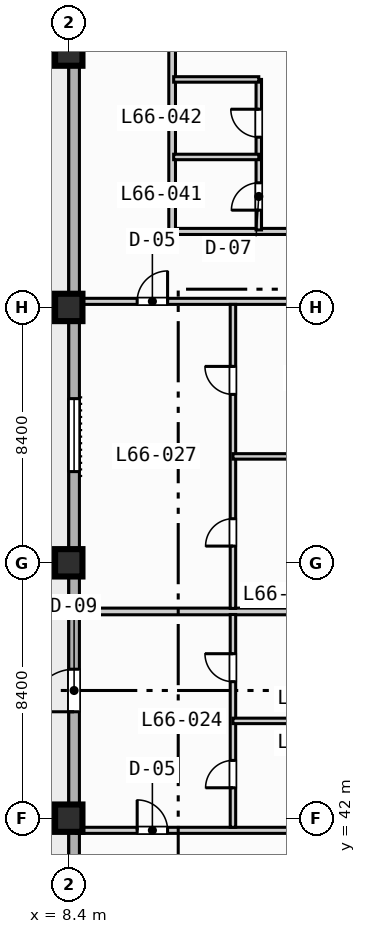
"""IFC4 building model, lengths in metres.
Left out: names, types, materials, properties, quantities, classifications, styles, units other than length and angle.
Written with IfcOpenShell. Run it as: python <this file> out.ifc"""

import sys

from ifc_helpers import new_model, si_unit, direction, frame, frame_2d, origin, origin_2d, place, context, subcontext, project, spatial, rectangle, extrude, element, fill, save


model = new_model("IFC4")
c1 = context("Model", 3, precision=1e-05, world=origin(), true_north=direction((0.0, 1.0)))
c2 = subcontext(c1, "Body", "Model", "MODEL_VIEW")
j1 = project(units=[si_unit("LENGTHUNIT", "METRE"), si_unit("PLANEANGLEUNIT", "RADIAN")], contexts=[c1])
p1 = place(None, origin())
s1 = spatial("IfcSite", under=j1, at=p1, CompositionType="ELEMENT")
p2 = place(p1, origin())
s2 = spatial("IfcBuilding", under=s1, at=p2, CompositionType="ELEMENT")
p3 = place(p2, frame((0.0, 0.0, 267.5)))
s3 = spatial("IfcBuildingStorey", under=s2, at=p3, CompositionType="ELEMENT", Elevation=267.5)
for number, where, z_axis, x_axis in (
    (1, (8.4, 42.0, 0.0), (0.0, 0.0, 1.0), (1.0, 0.0, 0.0)),
    (2, (8.4, 50.4, 0.0), (0.0, 0.0, 1.0), (1.0, 0.0, 0.0)),
    (3, (8.4, 58.8, 0.0), (0.0, 0.0, 1.0), (1.0, 0.0, 0.0)),
    (4, (8.4, 67.2, 0.0), (0.0, 0.0, 1.0), (1.0, 0.0, 0.0)),
):
    element("IfcColumn", number, at=place(p3, frame(where, z_axis=z_axis, x_axis=x_axis)), inside=s3, PredefinedType="COLUMN", context=c2, shape_type="SweptSolid", body=[
        extrude(rectangle(XDim=0.9, YDim=0.9, at=origin_2d()), origin(), (0.0, 0.0, 1.0), 3.7),
    ])
p4 = place(p3, frame((8.575, 11.575, 0.0), z_axis=(0.0, 0.0, 1.0), x_axis=(0.0, 1.0, 0.0)))
e5 = element("IfcWall", 5, at=p4, inside=s3, PredefinedType="STANDARD", context=c2, shape_type="SweptSolid", body=[
    extrude(rectangle(XDim=60.85, YDim=0.35, at=frame_2d((30.425, 0.0))), origin(), (0.0, 0.0, 1.0), 3.47),
])
p5 = place(p4, frame((33.925, 0.0, 0.0)))
e6 = element("IfcOpeningElement", 6, at=p5, cuts=e5, PredefinedType="OPENING", context=c2, shape_type="SweptSolid", body=[
    extrude(rectangle(XDim=1.4, YDim=2.2, at=frame_2d((0.7, 1.1))), frame((0.0, 0.185, 0.0), z_axis=(0.0, -1.0, 0.0), x_axis=(1.0, 0.0, 0.0)), (0.0, 0.0, 1.0), 0.37),
])
p6 = place(p4, frame((25.025, 0.0, 0.85)))
e7 = element("IfcOpeningElement", 7, at=p6, cuts=e5, PredefinedType="OPENING", context=c2, shape_type="SweptSolid", body=[
    extrude(rectangle(XDim=2.4, YDim=1.95, at=frame_2d((1.2, 0.975))), frame((0.0, 0.185, 0.0), z_axis=(0.0, -1.0, 0.0), x_axis=(1.0, 0.0, 0.0)), (0.0, 0.0, 1.0), 0.37),
])
p7 = place(p4, frame((41.825, 0.0, 0.85)))
e8 = element("IfcOpeningElement", 8, at=p7, cuts=e5, PredefinedType="OPENING", context=c2, shape_type="SweptSolid", body=[
    extrude(rectangle(XDim=2.4, YDim=1.95, at=frame_2d((1.2, 0.975))), frame((0.0, 0.185, 0.0), z_axis=(0.0, -1.0, 0.0), x_axis=(1.0, 0.0, 0.0)), (0.0, 0.0, 1.0), 0.37),
])
p8 = place(p4, frame((19.25, 0.0, 0.85)))
e9 = element("IfcOpeningElement", 9, at=p8, cuts=e5, PredefinedType="OPENING", context=c2, shape_type="SweptSolid", body=[
    extrude(rectangle(XDim=1.8, YDim=1.8, at=frame_2d((0.9, 0.9))), frame((0.0, 0.185, 0.0), z_axis=(0.0, -1.0, 0.0), x_axis=(1.0, 0.0, 0.0)), (0.0, 0.0, 1.0), 0.37),
])
p9 = place(p3, frame((8.65, 41.6, 0.0), z_axis=(0.0, 0.0, 1.0), x_axis=(1.0, 0.0, 0.0)))
e10 = element("IfcWall", 10, at=p9, inside=s3, PredefinedType="PARTITIONING", context=c2, shape_type="SweptSolid", body=[
    extrude(rectangle(XDim=7.95, YDim=0.2, at=frame_2d((3.975, 0.0))), origin(), (0.0, 0.0, 1.0), 3.47),
])
p10 = place(p9, frame((2.0, 0.0, 0.0)))
e11 = element("IfcOpeningElement", 11, at=p10, cuts=e10, PredefinedType="OPENING", context=c2, shape_type="SweptSolid", body=[
    extrude(rectangle(XDim=1.0, YDim=2.15, at=frame_2d((0.5, 1.075))), frame((0.0, 0.11, 0.0), z_axis=(0.0, -1.0, 0.0), x_axis=(1.0, 0.0, 0.0)), (0.0, 0.0, 1.0), 0.22),
])
p11 = place(p3, frame((8.65, 59.0, 0.0), z_axis=(0.0, 0.0, 1.0), x_axis=(1.0, 0.0, 0.0)))
e12 = element("IfcWall", 12, at=p11, inside=s3, PredefinedType="PARTITIONING", context=c2, shape_type="SweptSolid", body=[
    extrude(rectangle(XDim=7.95, YDim=0.2, at=frame_2d((3.975, 0.0))), origin(), (0.0, 0.0, 1.0), 2.82),
])
p12 = place(p11, frame((2.0, 0.0, 0.0)))
e13 = element("IfcOpeningElement", 13, at=p12, cuts=e12, PredefinedType="OPENING", context=c2, shape_type="SweptSolid", body=[
    extrude(rectangle(XDim=1.0, YDim=2.15, at=frame_2d((0.5, 1.075))), frame((0.0, 0.11, 0.0), z_axis=(0.0, -1.0, 0.0), x_axis=(1.0, 0.0, 0.0)), (0.0, 0.0, 1.0), 0.22),
])
p13 = place(p3, frame((8.65, 48.8, 0.0), z_axis=(0.0, 0.0, 1.0), x_axis=(1.0, 0.0, 0.0)))
e14 = element("IfcWall", 14, at=p13, inside=s3, PredefinedType="PARTITIONING", context=c2, shape_type="SweptSolid", body=[
    extrude(rectangle(XDim=7.95, YDim=0.22, at=frame_2d((3.975, 0.0))), origin(), (0.0, 0.0, 1.0), 3.47),
])
p14 = place(p3, frame((13.8, 41.7, 0.0), z_axis=(0.0, 0.0, 1.0), x_axis=(0.0, 1.0, 0.0)))
e15 = element("IfcWall", 15, at=p14, inside=s3, PredefinedType="PLUMBINGWALL", context=c2, shape_type="SweptSolid", body=[
    extrude(rectangle(XDim=7.0, YDim=0.18, at=frame_2d((3.5, 0.0))), origin(), (0.0, 0.0, 1.0), 3.47),
])
p15 = place(p14, frame((1.3, 0.0, 0.0)))
e16 = element("IfcOpeningElement", 16, at=p15, cuts=e15, PredefinedType="OPENING", context=c2, shape_type="SweptSolid", body=[
    extrude(rectangle(XDim=0.9, YDim=2.1, at=frame_2d((0.45, 1.05))), frame((0.0, 0.1, 0.0), z_axis=(0.0, -1.0, 0.0), x_axis=(1.0, 0.0, 0.0)), (0.0, 0.0, 1.0), 0.2),
])
p16 = place(p14, frame((4.79, 0.0, 0.0)))
e17 = element("IfcOpeningElement", 17, at=p16, cuts=e15, PredefinedType="OPENING", context=c2, shape_type="SweptSolid", body=[
    extrude(rectangle(XDim=0.92, YDim=2.1, at=frame_2d((0.46, 1.05))), frame((0.0, 0.1, 0.0), z_axis=(0.0, -1.0, 0.0), x_axis=(1.0, 0.0, 0.0)), (0.0, 0.0, 1.0), 0.2),
])
p17 = place(p3, frame((13.8, 45.2, 0.0), z_axis=(0.0, 0.0, 1.0), x_axis=(1.0, 0.0, 0.0)))
e18 = element("IfcWall", 18, at=p17, inside=s3, PredefinedType="PLUMBINGWALL", context=c2, shape_type="SweptSolid", body=[
    extrude(rectangle(XDim=2.8, YDim=0.18, at=frame_2d((1.4, 0.0))), origin(), (0.0, 0.0, 1.0), 3.47),
])
p18 = place(p3, frame((13.8, 48.9, 0.0), z_axis=(0.0, 0.0, 1.0), x_axis=(0.0, 1.0, 0.0)))
e19 = element("IfcWall", 19, at=p18, inside=s3, PredefinedType="PLUMBINGWALL", context=c2, shape_type="SweptSolid", body=[
    extrude(rectangle(XDim=10.0, YDim=0.18, at=frame_2d((5.0, 0.0))), origin(), (0.0, 0.0, 1.0), 3.47),
])
p19 = place(p18, frame((2.05, 0.0, 0.0)))
e20 = element("IfcOpeningElement", 20, at=p19, cuts=e19, PredefinedType="OPENING", context=c2, shape_type="SweptSolid", body=[
    extrude(rectangle(XDim=0.9, YDim=2.1, at=frame_2d((0.45, 1.05))), frame((0.0, 0.1, 0.0), z_axis=(0.0, -1.0, 0.0), x_axis=(1.0, 0.0, 0.0)), (0.0, 0.0, 1.0), 0.2),
])
p20 = place(p18, frame((7.04, 0.0, 0.0)))
e21 = element("IfcOpeningElement", 21, at=p20, cuts=e19, PredefinedType="OPENING", context=c2, shape_type="SweptSolid", body=[
    extrude(rectangle(XDim=0.92, YDim=2.1, at=frame_2d((0.46, 1.05))), frame((0.0, 0.1, 0.0), z_axis=(0.0, -1.0, 0.0), x_axis=(1.0, 0.0, 0.0)), (0.0, 0.0, 1.0), 0.2),
])
p21 = place(p3, frame((13.8, 53.9, 0.0), z_axis=(0.0, 0.0, 1.0), x_axis=(1.0, 0.0, 0.0)))
e22 = element("IfcWall", 22, at=p21, inside=s3, PredefinedType="PLUMBINGWALL", context=c2, shape_type="SweptSolid", body=[
    extrude(rectangle(XDim=2.8, YDim=0.18, at=frame_2d((1.4, 0.0))), origin(), (0.0, 0.0, 1.0), 3.47),
])
p22 = place(p3, frame((11.8, 61.3, 0.0), z_axis=(0.0, 0.0, 1.0), x_axis=(1.0, 0.0, 0.0)))
e23 = element("IfcWall", 23, at=p22, inside=s3, PredefinedType="PARTITIONING", context=c2, shape_type="SweptSolid", body=[
    extrude(rectangle(XDim=21.35, YDim=0.2, at=frame_2d((10.675, 0.0))), origin(), (0.0, 0.0, 1.0), 3.47),
])
p23 = place(p22, frame((4.05, 0.0, 0.0)))
e24 = element("IfcOpeningElement", 24, at=p23, cuts=e23, PredefinedType="OPENING", context=c2, shape_type="SweptSolid", body=[
    extrude(rectangle(XDim=1.0, YDim=2.15, at=frame_2d((0.5, 1.075))), frame((0.0, 0.11, 0.0), z_axis=(0.0, -1.0, 0.0), x_axis=(1.0, 0.0, 0.0)), (0.0, 0.0, 1.0), 0.22),
])
p24 = place(p3, frame((11.8, 61.3, 0.0), z_axis=(0.0, 0.0, 1.0), x_axis=(0.0, 1.0, 0.0)))
e25 = element("IfcWall", 25, at=p24, inside=s3, PredefinedType="PARTITIONING", context=c2, shape_type="SweptSolid", body=[
    extrude(rectangle(XDim=11.1, YDim=0.22, at=frame_2d((5.55, 0.0))), origin(), (0.0, 0.0, 1.0), 3.47),
])
p25 = place(p3, frame((14.65, 61.35, 0.0), z_axis=(0.0, 0.0, 1.0), x_axis=(0.0, 1.0, 0.0)))
e26 = element("IfcWall", 26, at=p25, inside=s3, PredefinedType="PLUMBINGWALL", context=c2, shape_type="SweptSolid", body=[
    extrude(rectangle(XDim=4.95, YDim=0.18, at=frame_2d((2.475, 0.0))), origin(), (0.0, 0.0, 1.0), 3.47),
])
p26 = place(p25, frame((0.65, 0.0, 0.0)))
e27 = element("IfcOpeningElement", 27, at=p26, cuts=e26, PredefinedType="OPENING", context=c2, shape_type="SweptSolid", body=[
    extrude(rectangle(XDim=0.9, YDim=2.1, at=frame_2d((0.45, 1.05))), frame((0.0, 0.1, 0.0), z_axis=(0.0, -1.0, 0.0), x_axis=(1.0, 0.0, 0.0)), (0.0, 0.0, 1.0), 0.2),
])
p27 = place(p25, frame((3.05, 0.0, 0.0)))
e28 = element("IfcOpeningElement", 28, at=p27, cuts=e26, PredefinedType="OPENING", context=c2, shape_type="SweptSolid", body=[
    extrude(rectangle(XDim=0.92, YDim=2.1, at=frame_2d((0.46, 1.05))), frame((0.0, 0.1, 0.0), z_axis=(0.0, -1.0, 0.0), x_axis=(1.0, 0.0, 0.0)), (0.0, 0.0, 1.0), 0.2),
])
for number, where, z_axis, x_axis in (
    (29, (11.85, 63.75, 0.0), (0.0, 0.0, 1.0), (1.0, 0.0, 0.0)),
    (30, (11.85, 66.3, 0.0), (0.0, 0.0, 1.0), (1.0, 0.0, 0.0)),
):
    element("IfcWall", number, at=place(p3, frame(where, z_axis=z_axis, x_axis=x_axis)), inside=s3, PredefinedType="PLUMBINGWALL", context=c2, shape_type="SweptSolid", body=[
        extrude(rectangle(XDim=2.8, YDim=0.18, at=frame_2d((1.4, 0.0))), origin(), (0.0, 0.0, 1.0), 3.47),
    ])
p28 = place(p5, origin())
e31 = element("IfcDoor", 31, at=p28, inside=s3, OperationType="SINGLE_SWING_LEFT", PredefinedType="DOOR", context=c2, shape_type="SweptSolid", body=[
    extrude(rectangle(XDim=1.4, YDim=2.2, at=frame_2d((0.7, 1.1))), frame((0.0, 0.025, 0.0), z_axis=(0.0, -1.0, 0.0), x_axis=(1.0, 0.0, 0.0)), (0.0, 0.0, 1.0), 0.05),
])
fill(e6, e31)
p29 = place(p7, origin())
e32 = element("IfcWindow", 32, at=p29, inside=s3, PartitioningType="SINGLE_PANEL", PredefinedType="WINDOW", context=c2, shape_type="SweptSolid", body=[
    extrude(rectangle(XDim=2.4, YDim=1.95, at=frame_2d((1.2, 0.975))), frame((0.0, 0.03, 0.0), z_axis=(0.0, -1.0, 0.0), x_axis=(1.0, 0.0, 0.0)), (0.0, 0.0, 1.0), 0.06),
])
fill(e8, e32)
p30 = place(p10, origin())
e33 = element("IfcDoor", 33, at=p30, inside=s3, OperationType="SINGLE_SWING_LEFT", PredefinedType="DOOR", context=c2, shape_type="SweptSolid", body=[
    extrude(rectangle(XDim=1.0, YDim=2.15, at=frame_2d((0.5, 1.075))), frame((0.0, 0.025, 0.0), z_axis=(0.0, -1.0, 0.0), x_axis=(1.0, 0.0, 0.0)), (0.0, 0.0, 1.0), 0.05),
])
fill(e11, e33)
p31 = place(p12, origin())
e34 = element("IfcDoor", 34, at=p31, inside=s3, OperationType="SINGLE_SWING_RIGHT", PredefinedType="DOOR", context=c2, shape_type="SweptSolid", body=[
    extrude(rectangle(XDim=1.0, YDim=2.15, at=frame_2d((0.5, 1.075))), frame((0.0, 0.025, 0.0), z_axis=(0.0, -1.0, 0.0), x_axis=(1.0, 0.0, 0.0)), (0.0, 0.0, 1.0), 0.05),
])
fill(e13, e34)
p32 = place(p15, origin())
e35 = element("IfcDoor", 35, at=p32, inside=s3, OperationType="SINGLE_SWING_LEFT", PredefinedType="DOOR", context=c2, shape_type="SweptSolid", body=[
    extrude(rectangle(XDim=0.9, YDim=2.1, at=frame_2d((0.45, 1.05))), frame((0.0, 0.025, 0.0), z_axis=(0.0, -1.0, 0.0), x_axis=(1.0, 0.0, 0.0)), (0.0, 0.0, 1.0), 0.05),
])
fill(e16, e35)
p33 = place(p16, origin())
e36 = element("IfcDoor", 36, at=p33, inside=s3, OperationType="SINGLE_SWING_RIGHT", PredefinedType="DOOR", context=c2, shape_type="SweptSolid", body=[
    extrude(rectangle(XDim=0.92, YDim=2.1, at=frame_2d((0.46, 1.05))), frame((0.0, 0.025, 0.0), z_axis=(0.0, -1.0, 0.0), x_axis=(1.0, 0.0, 0.0)), (0.0, 0.0, 1.0), 0.05),
])
fill(e17, e36)
p34 = place(p19, origin())
e37 = element("IfcDoor", 37, at=p34, inside=s3, OperationType="SINGLE_SWING_LEFT", PredefinedType="DOOR", context=c2, shape_type="SweptSolid", body=[
    extrude(rectangle(XDim=0.9, YDim=2.1, at=frame_2d((0.45, 1.05))), frame((0.0, 0.025, 0.0), z_axis=(0.0, -1.0, 0.0), x_axis=(1.0, 0.0, 0.0)), (0.0, 0.0, 1.0), 0.05),
])
fill(e20, e37)
p35 = place(p20, origin())
e38 = element("IfcDoor", 38, at=p35, inside=s3, OperationType="SINGLE_SWING_RIGHT", PredefinedType="DOOR", context=c2, shape_type="SweptSolid", body=[
    extrude(rectangle(XDim=0.92, YDim=2.1, at=frame_2d((0.46, 1.05))), frame((0.0, 0.025, 0.0), z_axis=(0.0, -1.0, 0.0), x_axis=(1.0, 0.0, 0.0)), (0.0, 0.0, 1.0), 0.05),
])
fill(e21, e38)
p36 = place(p26, origin())
e39 = element("IfcDoor", 39, at=p36, inside=s3, OperationType="SINGLE_SWING_LEFT", PredefinedType="DOOR", context=c2, shape_type="SweptSolid", body=[
    extrude(rectangle(XDim=0.9, YDim=2.1, at=frame_2d((0.45, 1.05))), frame((0.0, 0.025, 0.0), z_axis=(0.0, -1.0, 0.0), x_axis=(1.0, 0.0, 0.0)), (0.0, 0.0, 1.0), 0.05),
])
fill(e27, e39)
p37 = place(p27, origin())
e40 = element("IfcDoor", 40, at=p37, inside=s3, OperationType="SINGLE_SWING_RIGHT", PredefinedType="DOOR", context=c2, shape_type="SweptSolid", body=[
    extrude(rectangle(XDim=0.92, YDim=2.1, at=frame_2d((0.46, 1.05))), frame((0.0, 0.025, 0.0), z_axis=(0.0, -1.0, 0.0), x_axis=(1.0, 0.0, 0.0)), (0.0, 0.0, 1.0), 0.05),
])
fill(e28, e40)
save(model, sys.argv[1])
